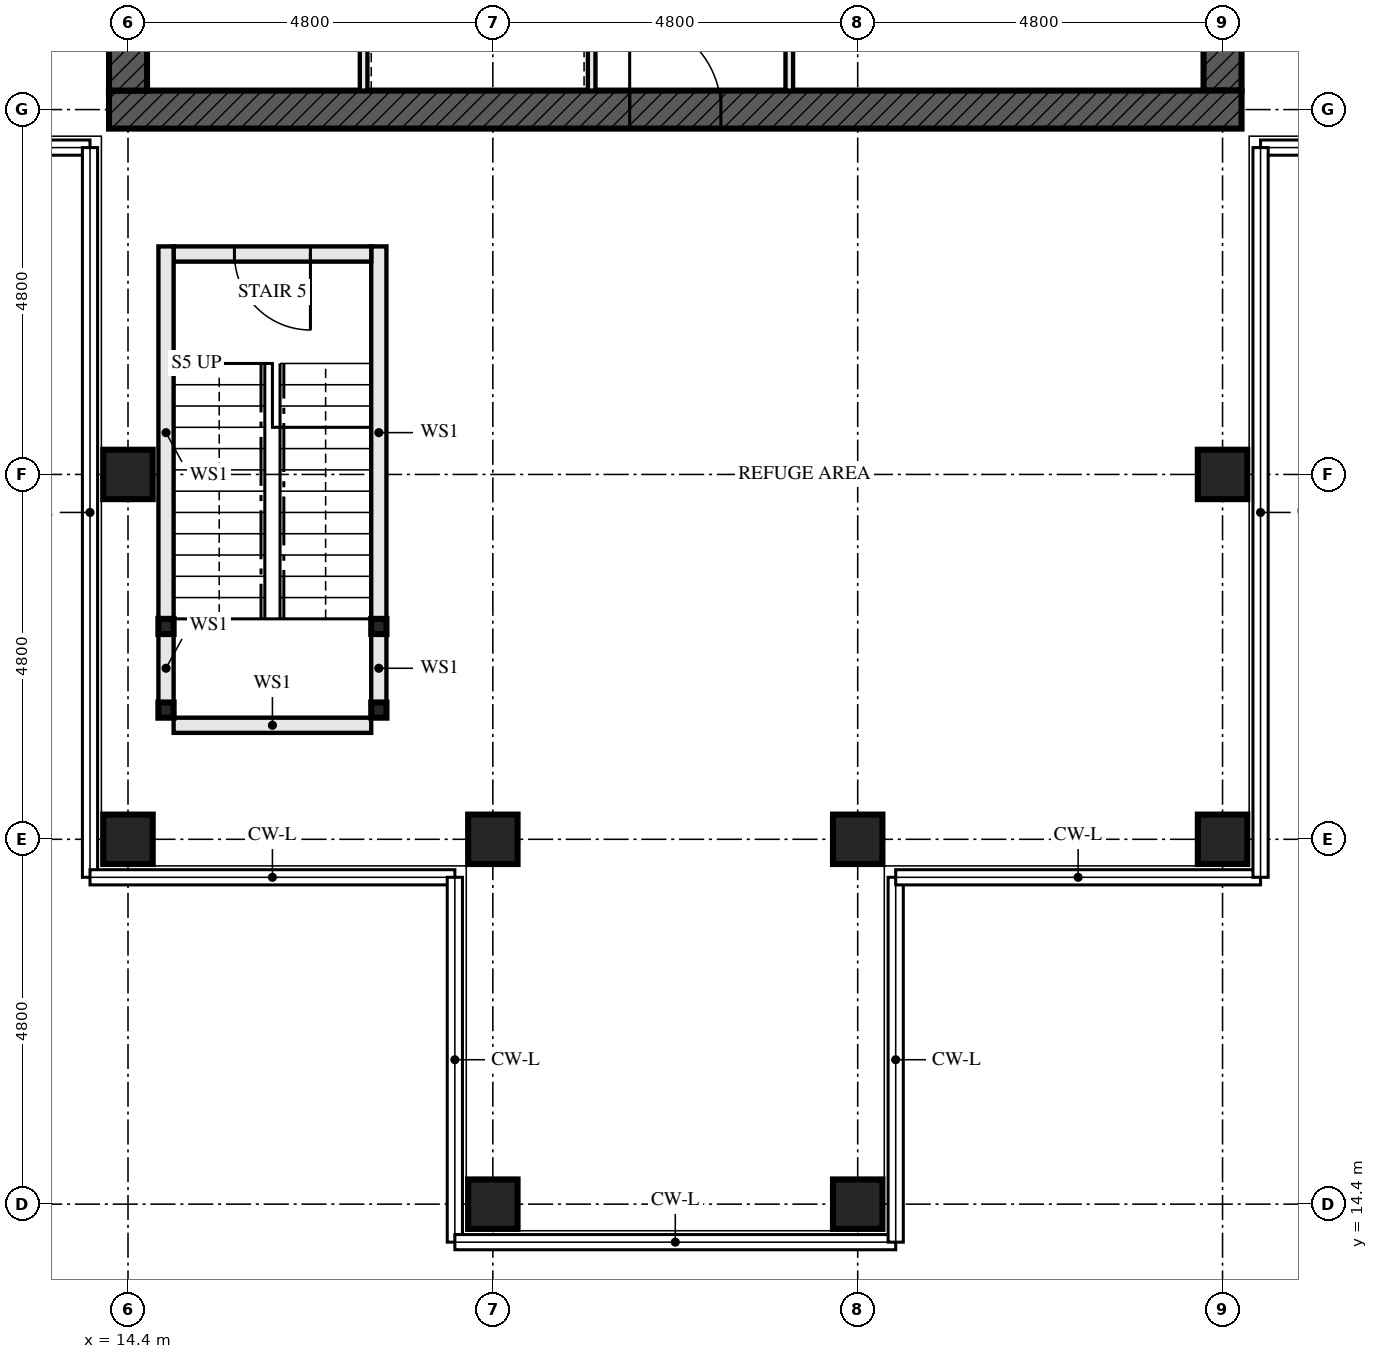
"""IFC4 building model, lengths in metres.
Left out: names, types, materials, properties, quantities, classifications, styles, units other than length and angle.
Written with IfcOpenShell. Run it as: python <this file> out.ifc"""

import sys

from ifc_helpers import new_model, si_unit, direction, frame, frame_2d, origin, origin_2d, place, context, subcontext, project, spatial, rectangle, hollow_rectangle, extrude, element, fill, save


model = new_model("IFC4")
c1 = context("Model", 3, precision=1e-05, world=origin(), true_north=direction((0.0, 1.0)))
c2 = subcontext(c1, "Body", "Model", "MODEL_VIEW")
j1 = project(units=[si_unit("LENGTHUNIT", "METRE"), si_unit("PLANEANGLEUNIT", "RADIAN")], contexts=[c1])
p1 = place(None, origin())
s1 = spatial("IfcSite", under=j1, at=p1, CompositionType="ELEMENT")
p2 = place(p1, origin())
s2 = spatial("IfcBuilding", under=s1, at=p2, CompositionType="ELEMENT")
p3 = place(p2, frame((0.0, 0.0, 190.0)))
s3 = spatial("IfcBuildingStorey", under=s2, at=p3, CompositionType="ELEMENT", Elevation=190.0)
for number, where, z_axis, x_axis in (
    (1, (14.4, 19.2, 0.0), (0.0, 0.0, 1.0), (0.0, 1.0, 0.0)),
    (2, (14.4, 24.0, 0.0), (0.0, 0.0, 1.0), (1.0, 0.0, 0.0)),
    (3, (19.2, 14.4, 0.0), (0.0, 0.0, 1.0), (0.0, 1.0, 0.0)),
    (4, (19.2, 19.2, 0.0), (0.0, 0.0, 1.0), (0.0, 1.0, 0.0)),
    (5, (24.0, 14.4, 0.0), (0.0, 0.0, 1.0), (0.0, 1.0, 0.0)),
    (6, (24.0, 19.2, 0.0), (0.0, 0.0, 1.0), (0.0, 1.0, 0.0)),
    (7, (28.8, 19.2, 0.0), (0.0, 0.0, 1.0), (0.0, 1.0, 0.0)),
    (8, (28.8, 24.0, 0.0), (0.0, 0.0, 1.0), (1.0, 0.0, 0.0)),
):
    element("IfcColumn", number, at=place(p3, frame(where, z_axis=z_axis, x_axis=x_axis)), inside=s3, PredefinedType="COLUMN", context=c2, shape_type="SweptSolid", body=[
        extrude(hollow_rectangle(XDim=0.65, YDim=0.65, WallThickness=0.08, at=origin_2d()), origin(), (0.0, 0.0, 1.0), 4.5),
    ])
p4 = place(p3, frame((14.15, 28.8, -0.25), z_axis=(0.0, 0.0, 1.0), x_axis=(1.0, 0.0, 0.0)))
e9 = element("IfcWall", 9, at=p4, inside=s3, PredefinedType="SHEAR", context=c2, shape_type="SweptSolid", body=[
    extrude(rectangle(XDim=14.9, YDim=0.5, at=frame_2d((7.45, 0.0))), origin(), (0.0, 0.0, 1.0), 4.58),
])
p5 = place(p4, frame((6.85, 0.0, 0.25)))
e10 = element("IfcOpeningElement", 10, at=p5, cuts=e9, PredefinedType="OPENING", context=c2, shape_type="SweptSolid", body=[
    extrude(rectangle(XDim=1.2, YDim=2.1, at=frame_2d((0.6, 1.05))), frame((0.0, 0.26, 0.0), z_axis=(0.0, -1.0, 0.0), x_axis=(1.0, 0.0, 0.0)), (0.0, 0.0, 1.0), 0.521),
])
p6 = place(p3, frame((14.4, 42.95, -0.25), z_axis=(0.0, 0.0, 1.0), x_axis=(0.0, -1.0, 0.0)))
e11 = element("IfcWall", 11, at=p6, inside=s3, PredefinedType="SHEAR", context=c2, shape_type="SweptSolid", body=[
    extrude(rectangle(XDim=13.9, YDim=0.5, at=frame_2d((6.95, 0.0))), origin(), (0.0, 0.0, 1.0), 4.58),
])
p7 = place(p6, frame((6.35, 0.0, 0.25)))
e12 = element("IfcOpeningElement", 12, at=p7, cuts=e11, PredefinedType="OPENING", context=c2, shape_type="SweptSolid", body=[
    extrude(rectangle(XDim=1.2, YDim=2.1, at=frame_2d((0.6, 1.05))), frame((0.0, 0.26, 0.0), z_axis=(0.0, -1.0, 0.0), x_axis=(1.0, 0.0, 0.0)), (0.0, 0.0, 1.0), 0.521),
])
p8 = place(p3, frame((28.8, 29.05, -0.25), z_axis=(0.0, 0.0, 1.0), x_axis=(0.0, 1.0, 0.0)))
e13 = element("IfcWall", 13, at=p8, inside=s3, PredefinedType="SHEAR", context=c2, shape_type="SweptSolid", body=[
    extrude(rectangle(XDim=13.9, YDim=0.5, at=frame_2d((6.95, 0.0))), origin(), (0.0, 0.0, 1.0), 4.58),
])
p9 = place(p8, frame((6.35, 0.0, 0.25)))
e14 = element("IfcOpeningElement", 14, at=p9, cuts=e13, PredefinedType="OPENING", context=c2, shape_type="SweptSolid", body=[
    extrude(rectangle(XDim=1.2, YDim=2.1, at=frame_2d((0.6, 1.05))), frame((0.0, 0.26, 0.0), z_axis=(0.0, -1.0, 0.0), x_axis=(1.0, 0.0, 0.0)), (0.0, 0.0, 1.0), 0.521),
])
for number, where, z_axis, x_axis in (
    (15, (14.9, 20.9, 0.0), (0.0, 0.0, 1.0), (1.0, 0.0, 0.0)),
    (16, (17.7, 20.9, 0.0), (0.0, 0.0, 1.0), (1.0, 0.0, 0.0)),
    (17, (14.9, 22.0, 0.0), (0.0, 0.0, 1.0), (1.0, 0.0, 0.0)),
    (18, (17.7, 22.0, 0.0), (0.0, 0.0, 1.0), (1.0, 0.0, 0.0)),
):
    element("IfcColumn", number, at=place(p3, frame(where, z_axis=z_axis, x_axis=x_axis)), inside=s3, PredefinedType="COLUMN", context=c2, shape_type="SweptSolid", body=[
        extrude(hollow_rectangle(XDim=0.2, YDim=0.2, WallThickness=0.008, at=origin_2d()), origin(), (0.0, 0.0, 1.0), 4.33),
    ])
p10 = place(p3, frame((14.9, 21.0, 0.0), z_axis=(0.0, 0.0, 1.0), x_axis=(0.0, 1.0, 0.0)))
e19 = element("IfcWall", 19, at=p10, inside=s3, PredefinedType="SOLIDWALL", context=c2, shape_type="SweptSolid", body=[
    extrude(rectangle(XDim=0.9, YDim=0.2, at=frame_2d((0.45, 0.0))), origin(), (0.0, 0.0, 1.0), 3.99),
])
p11 = place(p3, frame((14.9, 22.1, 0.0), z_axis=(0.0, 0.0, 1.0), x_axis=(0.0, 1.0, 0.0)))
e20 = element("IfcWall", 20, at=p11, inside=s3, PredefinedType="SOLIDWALL", context=c2, shape_type="SweptSolid", body=[
    extrude(rectangle(XDim=4.9, YDim=0.2, at=frame_2d((2.45, 0.0))), origin(), (0.0, 0.0, 1.0), 3.99),
])
p12 = place(p3, frame((17.7, 21.0, 0.0), z_axis=(0.0, 0.0, 1.0), x_axis=(0.0, 1.0, 0.0)))
e21 = element("IfcWall", 21, at=p12, inside=s3, PredefinedType="SOLIDWALL", context=c2, shape_type="SweptSolid", body=[
    extrude(rectangle(XDim=0.9, YDim=0.2, at=frame_2d((0.45, 0.0))), origin(), (0.0, 0.0, 1.0), 3.99),
])
p13 = place(p3, frame((17.7, 22.1, 0.0), z_axis=(0.0, 0.0, 1.0), x_axis=(0.0, 1.0, 0.0)))
e22 = element("IfcWall", 22, at=p13, inside=s3, PredefinedType="SOLIDWALL", context=c2, shape_type="SweptSolid", body=[
    extrude(rectangle(XDim=4.9, YDim=0.2, at=frame_2d((2.45, 0.0))), origin(), (0.0, 0.0, 1.0), 3.99),
])
p14 = place(p3, frame((15.0, 20.7, 0.0), z_axis=(0.0, 0.0, 1.0), x_axis=(1.0, 0.0, 0.0)))
e23 = element("IfcWall", 23, at=p14, inside=s3, PredefinedType="SOLIDWALL", context=c2, shape_type="SweptSolid", body=[
    extrude(rectangle(XDim=2.6, YDim=0.2, at=frame_2d((1.3, 0.0))), origin(), (0.0, 0.0, 1.0), 4.33),
])
p15 = place(p3, frame((15.0, 26.9, 0.0), z_axis=(0.0, 0.0, 1.0), x_axis=(1.0, 0.0, 0.0)))
e24 = element("IfcWall", 24, at=p15, inside=s3, PredefinedType="SOLIDWALL", context=c2, shape_type="SweptSolid", body=[
    extrude(rectangle(XDim=2.6, YDim=0.2, at=frame_2d((1.3, 0.0))), origin(), (0.0, 0.0, 1.0), 4.33),
])
p16 = place(p15, frame((0.8, 0.0, 0.0)))
e25 = element("IfcOpeningElement", 25, at=p16, cuts=e24, PredefinedType="OPENING", context=c2, shape_type="SweptSolid", body=[
    extrude(rectangle(XDim=1.0, YDim=2.1, at=frame_2d((0.5, 1.05))), frame((0.0, 0.111, 0.0), z_axis=(0.0, -1.0, 0.0), x_axis=(1.0, 0.0, 0.0)), (0.0, 0.0, 1.0), 0.221),
])
p17 = place(p3, frame((20.5, 29.05, 0.0), z_axis=(0.0, 0.0, 1.0), x_axis=(0.0, 1.0, 0.0)))
e26 = element("IfcWall", 26, at=p17, inside=s3, PredefinedType="SOLIDWALL", context=c2, shape_type="SweptSolid", body=[
    extrude(rectangle(XDim=5.8, YDim=0.1, at=frame_2d((2.9, 0.0))), origin(), (0.0, 0.0, 1.0), 4.33),
])
p18 = place(p17, frame((0.8, 0.0, 0.0)))
e27 = element("IfcOpeningElement", 27, at=p18, cuts=e26, PredefinedType="OPENING", context=c2, shape_type="SweptSolid", body=[
    extrude(rectangle(XDim=1.1, YDim=2.3, at=frame_2d((0.55, 1.15))), frame((0.0, 0.061, 0.0), z_axis=(0.0, -1.0, 0.0), x_axis=(1.0, 0.0, 0.0)), (0.0, 0.0, 1.0), 0.121),
])
p19 = place(p17, frame((3.775, 0.0, 0.0)))
e28 = element("IfcOpeningElement", 28, at=p19, cuts=e26, PredefinedType="OPENING", context=c2, shape_type="SweptSolid", body=[
    extrude(rectangle(XDim=1.1, YDim=2.3, at=frame_2d((0.55, 1.15))), frame((0.0, 0.061, 0.0), z_axis=(0.0, -1.0, 0.0), x_axis=(1.0, 0.0, 0.0)), (0.0, 0.0, 1.0), 0.121),
])
p20 = place(p3, frame((23.1, 29.05, 0.0), z_axis=(0.0, 0.0, 1.0), x_axis=(0.0, 1.0, 0.0)))
e29 = element("IfcWall", 29, at=p20, inside=s3, PredefinedType="SOLIDWALL", context=c2, shape_type="SweptSolid", body=[
    extrude(rectangle(XDim=5.8, YDim=0.1, at=frame_2d((2.9, 0.0))), origin(), (0.0, 0.0, 1.0), 4.33),
])
p21 = place(p20, frame((1.0, 0.0, 0.0)))
e30 = element("IfcOpeningElement", 30, at=p21, cuts=e29, PredefinedType="OPENING", context=c2, shape_type="SweptSolid", body=[
    extrude(rectangle(XDim=0.7, YDim=2.1, at=frame_2d((0.35, 1.05))), frame((0.0, 0.061, 0.0), z_axis=(0.0, -1.0, 0.0), x_axis=(1.0, 0.0, 0.0)), (0.0, 0.0, 1.0), 0.121),
])
p22 = place(p3, frame((17.5, 29.05, 0.0), z_axis=(0.0, 0.0, 1.0), x_axis=(0.0, 1.0, 0.0)))
e31 = element("IfcWall", 31, at=p22, inside=s3, PredefinedType="SOLIDWALL", context=c2, shape_type="SweptSolid", body=[
    extrude(rectangle(XDim=5.8, YDim=0.1, at=frame_2d((2.9, 0.0))), origin(), (0.0, 0.0, 1.0), 4.33),
])
p23 = place(p16, frame((1.0, 0.0, 0.0), z_axis=(0.0, 0.0, 1.0), x_axis=(-1.0, 0.0, 0.0)))
e32 = element("IfcDoor", 32, at=p23, inside=s3, OperationType="SINGLE_SWING_RIGHT", PredefinedType="DOOR", context=c2, shape_type="SweptSolid", body=[
    extrude(rectangle(XDim=1.0, YDim=2.1, at=frame_2d((0.5, 1.05))), frame((0.0, 0.032, 0.0), z_axis=(0.0, -1.0, 0.0), x_axis=(1.0, 0.0, 0.0)), (0.0, 0.0, 1.0), 0.064),
])
fill(e25, e32)
p24 = place(p5, origin())
e33 = element("IfcDoor", 33, at=p24, inside=s3, OperationType="SINGLE_SWING_LEFT", PredefinedType="DOOR", context=c2, shape_type="SweptSolid", body=[
    extrude(rectangle(XDim=1.2, YDim=2.1, at=frame_2d((0.6, 1.05))), frame((0.0, 0.027, 0.0), z_axis=(0.0, -1.0, 0.0), x_axis=(1.0, 0.0, 0.0)), (0.0, 0.0, 1.0), 0.054),
])
fill(e10, e33)
save(model, sys.argv[1])
